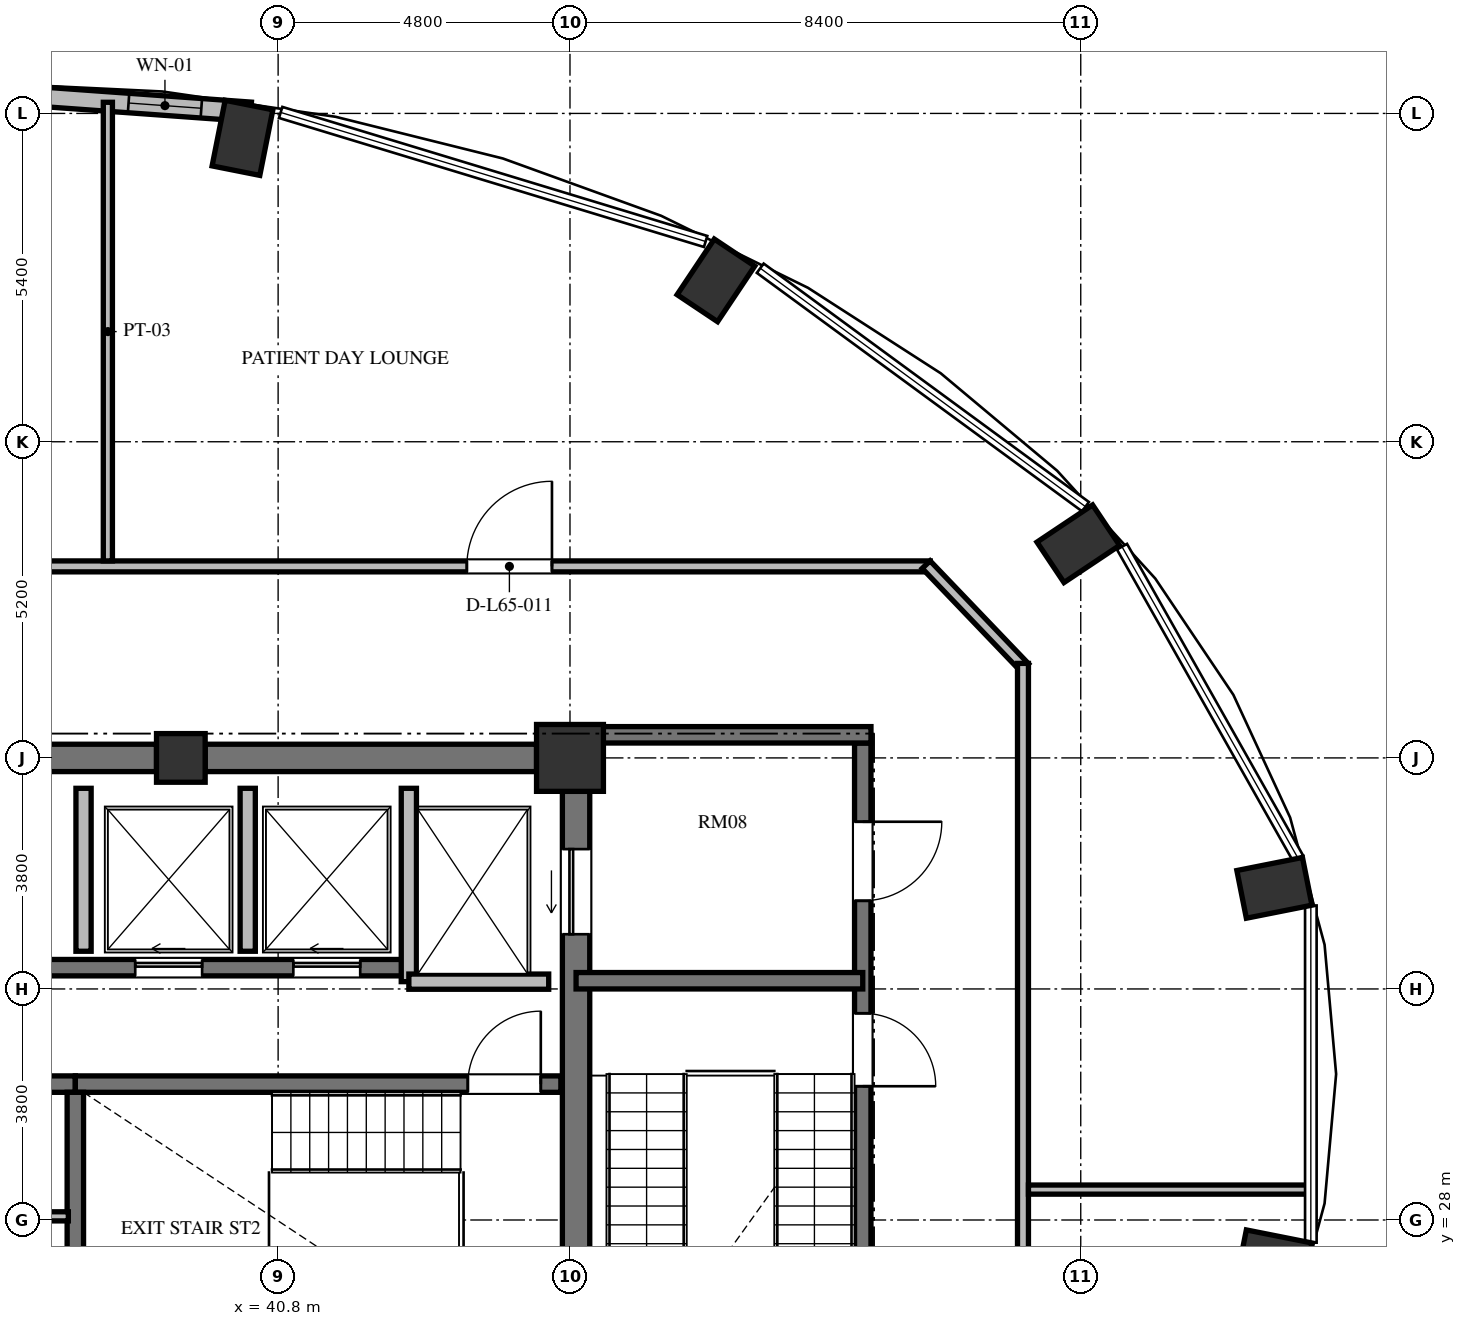
"""IFC4 building model, lengths in metres.
Left out: names, types, materials, properties, quantities, classifications, styles, units other than length and angle.
Written with IfcOpenShell. Run it as: python <this file> out.ifc"""

import sys

from ifc_helpers import new_model, si_unit, direction, frame, frame_2d, origin, origin_2d, place, context, subcontext, project, spatial, rectangle, extrude, element, fill, save


model = new_model("IFC4")
c1 = context("Model", 3, precision=1e-05, world=origin(), true_north=direction((0.0, 1.0)))
c2 = subcontext(c1, "Body", "Model", "MODEL_VIEW")
j1 = project(units=[si_unit("LENGTHUNIT", "METRE"), si_unit("PLANEANGLEUNIT", "RADIAN")], contexts=[c1])
p1 = place(None, origin())
s1 = spatial("IfcSite", under=j1, at=p1, CompositionType="ELEMENT")
p2 = place(p1, origin())
s2 = spatial("IfcBuilding", under=s1, at=p2, CompositionType="ELEMENT")
p3 = place(p2, frame((0.0, 0.0, 251.376)))
s3 = spatial("IfcBuildingStorey", under=s2, at=p3, CompositionType="ELEMENT", Elevation=251.376)
for number, where, z_axis, x_axis in (
    (1, (57.185, 27.337, 0.0), (0.0, 0.0, 1.0), (0.981, -0.195, 0.0)),
    (2, (57.185, 33.463, 0.0), (0.0, 0.0, 1.0), (0.981, 0.195, 0.0)),
    (3, (53.96, 39.123, 0.0), (0.0, 0.0, 1.0), (0.831, 0.556, 0.0)),
    (4, (48.0, 43.454, 0.0), (0.0, 0.0, 1.0), (0.556, 0.831, 0.0)),
    (5, (40.214, 45.798, 0.0), (0.0, 0.0, 1.0), (0.195, 0.981, 0.0)),
):
    element("IfcColumn", number, at=place(p3, frame(where, z_axis=z_axis, x_axis=x_axis)), inside=s3, PredefinedType="COLUMN", context=c2, shape_type="SweptSolid", body=[
        extrude(rectangle(XDim=1.1, YDim=0.8, at=origin_2d()), origin(), (0.0, 0.0, 1.0), 3.648),
    ])
p4 = place(p3, frame((45.6, 35.6, 0.0), z_axis=(0.0, 0.0, 1.0), x_axis=(1.0, 0.0, 0.0)))
e6 = element("IfcColumn", 6, at=p4, inside=s3, PredefinedType="COLUMN", context=c2, shape_type="SweptSolid", body=[
    extrude(rectangle(XDim=1.1, YDim=1.1, at=origin_2d()), origin(), (0.0, 0.0, 1.0), 3.648),
])
p5 = place(p3, frame((39.2, 35.6, 0.0), z_axis=(0.0, 0.0, 1.0), x_axis=(1.0, 0.0, 0.0)))
e7 = element("IfcColumn", 7, at=p5, inside=s3, PredefinedType="COLUMN", context=c2, shape_type="SweptSolid", body=[
    extrude(rectangle(XDim=0.8, YDim=0.8, at=origin_2d()), origin(), (0.0, 0.0, 1.0), 3.648),
])
p6 = place(p3, frame((45.7, 20.95, 0.0), z_axis=(0.0, 0.0, 1.0), x_axis=(0.0, 1.0, 0.0)))
e8 = element("IfcWall", 8, at=p6, inside=s3, PredefinedType="SHEAR", context=c2, shape_type="SweptSolid", body=[
    extrude(rectangle(XDim=14.1, YDim=0.45, at=frame_2d((7.05, 0.0))), origin(), (0.0, 0.0, 1.0), 3.648),
])
p7 = place(p6, frame((11.75, 0.0, 0.0)))
e9 = element("IfcOpeningElement", 9, at=p7, cuts=e8, PredefinedType="OPENING", context=c2, shape_type="SweptSolid", body=[
    extrude(rectangle(XDim=1.4, YDim=2.3, at=frame_2d((0.7, 1.15))), frame((0.0, 0.235, 0.0), z_axis=(0.0, -1.0, 0.0), x_axis=(1.0, 0.0, 0.0)), (0.0, 0.0, 1.0), 0.47),
])
p8 = place(p6, frame((0.95, 0.0, 0.0)))
e10 = element("IfcOpeningElement", 10, at=p8, cuts=e8, PredefinedType="OPENING", context=c2, shape_type="SweptSolid", body=[
    extrude(rectangle(XDim=1.4, YDim=2.3, at=frame_2d((0.7, 1.15))), frame((0.0, 0.235, 0.0), z_axis=(0.0, -1.0, 0.0), x_axis=(1.0, 0.0, 0.0)), (0.0, 0.0, 1.0), 0.47),
])
p9 = place(p3, frame((33.2, 35.6, 0.0), z_axis=(0.0, 0.0, 1.0), x_axis=(1.0, 0.0, 0.0)))
e11 = element("IfcWall", 11, at=p9, inside=s3, PredefinedType="SHEAR", context=c2, shape_type="SweptSolid", body=[
    extrude(rectangle(XDim=5.6, YDim=0.45, at=frame_2d((2.8, 0.0))), origin(), (0.0, 0.0, 1.0), 3.648),
])
p10 = place(p3, frame((39.6, 35.6, 0.0), z_axis=(0.0, 0.0, 1.0), x_axis=(1.0, 0.0, 0.0)))
e12 = element("IfcWall", 12, at=p10, inside=s3, PredefinedType="SHEAR", context=c2, shape_type="SweptSolid", body=[
    extrude(rectangle(XDim=5.45, YDim=0.45, at=frame_2d((2.725, 0.0))), origin(), (0.0, 0.0, 1.0), 3.648),
])
p11 = place(p3, frame((40.35, 46.226, 0.0), z_axis=(0.0, 0.0, 1.0), x_axis=(-0.997409061056, 0.071938619141, 0.0)))
e13 = element("IfcWall", 13, at=p11, inside=s3, PredefinedType="SOLIDWALL", context=c2, shape_type="SweptSolid", body=[
    extrude(rectangle(XDim=4.541, YDim=0.32, at=frame_2d((2.271, 0.0))), origin(), (0.0, 0.0, 1.0), 3.448),
])
p12 = place(p11, frame((0.815, 0.0, 0.85)))
e14 = element("IfcOpeningElement", 14, at=p12, cuts=e13, PredefinedType="OPENING", context=c2, shape_type="SweptSolid", body=[
    extrude(rectangle(XDim=1.2, YDim=2.2, at=frame_2d((0.6, 1.1))), frame((0.0, 0.17, 0.0), z_axis=(0.0, -1.0, 0.0), x_axis=(1.0, 0.0, 0.0)), (0.0, 0.0, 1.0), 0.34),
])
p13 = place(p3, frame((34.535, 30.235, 0.0), z_axis=(0.0, 0.0, 1.0), x_axis=(1.0, 0.0, 0.0)))
e15 = element("IfcWall", 15, at=p13, inside=s3, PredefinedType="SHEAR", context=c2, shape_type="SweptSolid", body=[
    extrude(rectangle(XDim=2.93, YDim=0.27, at=frame_2d((1.465, 0.0))), origin(), (0.0, 0.0, 1.0), 3.648),
])
p14 = place(p13, frame((0.915, 0.0, 0.0)))
e16 = element("IfcOpeningElement", 16, at=p14, cuts=e15, PredefinedType="OPENING", context=c2, shape_type="SweptSolid", body=[
    extrude(rectangle(XDim=1.1, YDim=2.15, at=frame_2d((0.55, 1.075))), frame((0.0, 0.145, 0.0), z_axis=(0.0, -1.0, 0.0), x_axis=(1.0, 0.0, 0.0)), (0.0, 0.0, 1.0), 0.29),
])
p15 = place(p3, frame((37.465, 30.235, 0.0), z_axis=(0.0, 0.0, 1.0), x_axis=(1.0, 0.0, 0.0)))
e17 = element("IfcWall", 17, at=p15, inside=s3, PredefinedType="SHEAR", context=c2, shape_type="SweptSolid", body=[
    extrude(rectangle(XDim=7.985, YDim=0.27, at=frame_2d((3.992, 0.0))), origin(), (0.0, 0.0, 1.0), 3.648),
])
p16 = place(p15, frame((6.455, 0.0, 0.0)))
e18 = element("IfcOpeningElement", 18, at=p16, cuts=e17, PredefinedType="OPENING", context=c2, shape_type="SweptSolid", body=[
    extrude(rectangle(XDim=1.2, YDim=2.15, at=frame_2d((0.6, 1.075))), frame((0.0, 0.145, 0.0), z_axis=(0.0, -1.0, 0.0), x_axis=(1.0, 0.0, 0.0)), (0.0, 0.0, 1.0), 0.29),
])
p17 = place(p3, frame((37.465, 26.02, 0.0), z_axis=(0.0, 0.0, 1.0), x_axis=(0.0, 1.0, 0.0)))
e19 = element("IfcWall", 19, at=p17, inside=s3, PredefinedType="SHEAR", context=c2, shape_type="SweptSolid", body=[
    extrude(rectangle(XDim=4.08, YDim=0.27, at=frame_2d((2.04, 0.0))), origin(), (0.0, 0.0, 1.0), 3.648),
])
p18 = place(p3, frame((34.65, 28.06, 0.0), z_axis=(0.0, 0.0, 1.0), x_axis=(1.0, 0.0, 0.0)))
e20 = element("IfcWall", 20, at=p18, inside=s3, PredefinedType="PARTITIONING", context=c2, shape_type="SweptSolid", body=[
    extrude(rectangle(XDim=2.7, YDim=0.15, at=frame_2d((1.35, 0.0))), origin(), (0.0, 0.0, 1.0), 3.448),
])
p19 = place(p3, frame((26.55, 32.15, 0.0), z_axis=(0.0, 0.0, 1.0), x_axis=(1.0, 0.0, 0.0)))
e21 = element("IfcWall", 21, at=p19, inside=s3, PredefinedType="SHEAR", context=c2, shape_type="SweptSolid", body=[
    extrude(rectangle(XDim=16.4, YDim=0.27, at=frame_2d((8.2, 0.0))), origin(), (0.0, 0.0, 1.0), 3.648),
])
p20 = place(p19, frame((2.175, 0.0, 0.0)))
e22 = element("IfcOpeningElement", 22, at=p20, cuts=e21, PredefinedType="OPENING", context=c2, shape_type="SweptSolid", body=[
    extrude(rectangle(XDim=1.05, YDim=2.15, at=frame_2d((0.525, 1.075))), frame((0.0, 0.145, 0.0), z_axis=(0.0, -1.0, 0.0), x_axis=(1.0, 0.0, 0.0)), (0.0, 0.0, 1.0), 0.29),
])
p21 = place(p19, frame((7.575, 0.0, 0.0)))
e23 = element("IfcOpeningElement", 23, at=p21, cuts=e21, PredefinedType="OPENING", context=c2, shape_type="SweptSolid", body=[
    extrude(rectangle(XDim=1.05, YDim=2.15, at=frame_2d((0.525, 1.075))), frame((0.0, 0.145, 0.0), z_axis=(0.0, -1.0, 0.0), x_axis=(1.0, 0.0, 0.0)), (0.0, 0.0, 1.0), 0.29),
])
p22 = place(p19, frame((11.9, 0.0, 0.0)))
e24 = element("IfcOpeningElement", 24, at=p22, cuts=e21, PredefinedType="OPENING", context=c2, shape_type="SweptSolid", body=[
    extrude(rectangle(XDim=1.1, YDim=2.2, at=frame_2d((0.55, 1.1))), frame((0.0, 0.145, 0.0), z_axis=(0.0, -1.0, 0.0), x_axis=(1.0, 0.0, 0.0)), (0.0, 0.0, 1.0), 0.29),
])
p23 = place(p19, frame((14.5, 0.0, 0.0)))
e25 = element("IfcOpeningElement", 25, at=p23, cuts=e21, PredefinedType="OPENING", context=c2, shape_type="SweptSolid", body=[
    extrude(rectangle(XDim=1.1, YDim=2.2, at=frame_2d((0.55, 1.1))), frame((0.0, 0.145, 0.0), z_axis=(0.0, -1.0, 0.0), x_axis=(1.0, 0.0, 0.0)), (0.0, 0.0, 1.0), 0.29),
])
p24 = place(p3, frame((42.95, 31.92, 0.0), z_axis=(0.0, 0.0, 1.0), x_axis=(0.0, 1.0, 0.0)))
e26 = element("IfcWall", 26, at=p24, inside=s3, PredefinedType="SOLIDWALL", context=c2, shape_type="SweptSolid", body=[
    extrude(rectangle(XDim=3.18, YDim=0.25, at=frame_2d((1.59, 0.0))), origin(), (0.0, 0.0, 1.0), 3.448),
])
p25 = place(p3, frame((42.95, 31.92, 0.0), z_axis=(0.0, 0.0, 1.0), x_axis=(1.0, 0.0, 0.0)))
e27 = element("IfcWall", 27, at=p25, inside=s3, PredefinedType="SOLIDWALL", context=c2, shape_type="SweptSolid", body=[
    extrude(rectangle(XDim=2.3, YDim=0.25, at=frame_2d((1.15, 0.0))), origin(), (0.0, 0.0, 1.0), 3.448),
])
for number, where, z_axis, x_axis in (
    (28, (37.6, 32.42, 0.0), (0.0, 0.0, 1.0), (0.0, 1.0, 0.0)),
    (29, (40.3, 32.42, 0.0), (0.0, 0.0, 1.0), (0.0, 1.0, 0.0)),
):
    element("IfcWall", number, at=place(p3, frame(where, z_axis=z_axis, x_axis=x_axis)), inside=s3, PredefinedType="SOLIDWALL", context=c2, shape_type="SweptSolid", body=[
        extrude(rectangle(XDim=2.68, YDim=0.25, at=frame_2d((1.34, 0.0))), origin(), (0.0, 0.0, 1.0), 3.448),
    ])
p26 = place(p3, frame((50.415, 35.845, 0.0), z_axis=(0.0, 0.0, 1.0), x_axis=(0.0, -1.0, 0.0)))
e30 = element("IfcWall", 30, at=p26, inside=s3, PredefinedType="SHEAR", context=c2, shape_type="SweptSolid", body=[
    extrude(rectangle(XDim=15.825, YDim=0.27, at=frame_2d((7.913, 0.0))), origin(), (0.0, 0.0, 1.0), 3.648),
])
p27 = place(p26, frame((4.445, 0.0, 0.0)))
e31 = element("IfcOpeningElement", 31, at=p27, cuts=e30, PredefinedType="OPENING", context=c2, shape_type="SweptSolid", body=[
    extrude(rectangle(XDim=1.2, YDim=2.15, at=frame_2d((0.6, 1.075))), frame((0.0, 0.145, 0.0), z_axis=(0.0, -1.0, 0.0), x_axis=(1.0, 0.0, 0.0)), (0.0, 0.0, 1.0), 0.29),
])
p28 = place(p26, frame((1.295, 0.0, 0.0)))
e32 = element("IfcOpeningElement", 32, at=p28, cuts=e30, PredefinedType="OPENING", context=c2, shape_type="SweptSolid", body=[
    extrude(rectangle(XDim=1.3, YDim=2.2, at=frame_2d((0.65, 1.1))), frame((0.0, 0.145, 0.0), z_axis=(0.0, -1.0, 0.0), x_axis=(1.0, 0.0, 0.0)), (0.0, 0.0, 1.0), 0.29),
])
p29 = place(p26, frame((13.095, 0.0, 0.0)))
e33 = element("IfcOpeningElement", 33, at=p29, cuts=e30, PredefinedType="OPENING", context=c2, shape_type="SweptSolid", body=[
    extrude(rectangle(XDim=1.3, YDim=2.2, at=frame_2d((0.65, 1.1))), frame((0.0, 0.145, 0.0), z_axis=(0.0, -1.0, 0.0), x_axis=(1.0, 0.0, 0.0)), (0.0, 0.0, 1.0), 0.29),
])
p30 = place(p3, frame((45.925, 35.98, 0.0), z_axis=(0.0, 0.0, 1.0), x_axis=(1.0, 0.0, 0.0)))
e34 = element("IfcWall", 34, at=p30, inside=s3, PredefinedType="SHEAR", context=c2, shape_type="SweptSolid", body=[
    extrude(rectangle(XDim=4.625, YDim=0.27, at=frame_2d((2.312, 0.0))), origin(), (0.0, 0.0, 1.0), 3.648),
])
p31 = place(p3, frame((45.7, 31.935, 0.0), z_axis=(0.0, 0.0, 1.0), x_axis=(1.0, 0.0, 0.0)))
e35 = element("IfcWall", 35, at=p31, inside=s3, PredefinedType="SHEAR", context=c2, shape_type="SweptSolid", body=[
    extrude(rectangle(XDim=4.715, YDim=0.27, at=frame_2d((2.357, 0.0))), origin(), (0.0, 0.0, 1.0), 3.648),
])
p32 = place(p3, frame((30.71, 38.75, 0.0), z_axis=(0.0, 0.0, 1.0), x_axis=(1.0, 0.0, 0.0)))
e36 = element("IfcWall", 36, at=p32, inside=s3, PredefinedType="PARTITIONING", context=c2, shape_type="SweptSolid", body=[
    extrude(rectangle(XDim=20.815, YDim=0.18, at=frame_2d((10.408, 0.0))), origin(), (0.0, 0.0, 1.0), 3.073),
])
p33 = place(p32, frame((13.194, 0.0, 0.0)))
e37 = element("IfcOpeningElement", 37, at=p33, cuts=e36, PredefinedType="OPENING", context=c2, shape_type="SweptSolid", body=[
    extrude(rectangle(XDim=1.4, YDim=2.2, at=frame_2d((0.7, 1.1))), frame((0.0, 0.1, 0.0), z_axis=(0.0, -1.0, 0.0), x_axis=(1.0, 0.0, 0.0)), (0.0, 0.0, 1.0), 0.2),
])
p34 = place(p3, frame((51.458, 38.779, 0.0), z_axis=(0.0, 0.0, 1.0), x_axis=(0.691359830363, -0.722510612352, 0.0)))
e38 = element("IfcWall", 38, at=p34, inside=s3, PredefinedType="PARTITIONING", context=c2, shape_type="SweptSolid", body=[
    extrude(rectangle(XDim=2.343, YDim=0.18, at=frame_2d((1.172, 0.0))), origin(), (0.0, 0.0, 1.0), 3.033),
])
p35 = place(p3, frame((53.05, 37.155, 0.0), z_axis=(0.0, 0.0, 1.0), x_axis=(0.0, -1.0, 0.0)))
e39 = element("IfcWall", 39, at=p35, inside=s3, PredefinedType="PARTITIONING", context=c2, shape_type="SweptSolid", body=[
    extrude(rectangle(XDim=13.509, YDim=0.18, at=frame_2d((6.754, 0.0))), origin(), (0.0, 0.0, 1.0), 3.448),
])
p36 = place(p3, frame((53.14, 28.5, 0.0), z_axis=(0.0, 0.0, 1.0), x_axis=(1.0, 0.0, 0.0)))
e40 = element("IfcWall", 40, at=p36, inside=s3, PredefinedType="PARTITIONING", context=c2, shape_type="SweptSolid", body=[
    extrude(rectangle(XDim=4.632, YDim=0.15, at=frame_2d((2.316, 0.0))), origin(), (0.0, 0.0, 1.0), 3.448),
])
p37 = place(p3, frame((38.0, 38.84, 0.0), z_axis=(0.0, 0.0, 1.0), x_axis=(0.0, 1.0, 0.0)))
e41 = element("IfcWall", 41, at=p37, inside=s3, PredefinedType="PARTITIONING", context=c2, shape_type="SweptSolid", body=[
    extrude(rectangle(XDim=7.543, YDim=0.15, at=frame_2d((3.771, 0.0))), origin(), (0.0, 0.0, 1.0), 3.448),
])
p38 = place(p12, origin())
e42 = element("IfcWindow", 42, at=p38, inside=s3, PartitioningType="SINGLE_PANEL", PredefinedType="WINDOW", context=c2, shape_type="SweptSolid", body=[
    extrude(rectangle(XDim=1.2, YDim=2.2, at=frame_2d((0.6, 1.1))), frame((0.0, 0.03, 0.0), z_axis=(0.0, -1.0, 0.0), x_axis=(1.0, 0.0, 0.0)), (0.0, 0.0, 1.0), 0.06),
])
fill(e14, e42)
p39 = place(p16, origin())
e43 = element("IfcDoor", 43, at=p39, inside=s3, OperationType="SINGLE_SWING_RIGHT", PredefinedType="DOOR", context=c2, shape_type="SweptSolid", body=[
    extrude(rectangle(XDim=1.2, YDim=2.15, at=frame_2d((0.6, 1.075))), frame((0.0, 0.025, 0.0), z_axis=(0.0, -1.0, 0.0), x_axis=(1.0, 0.0, 0.0)), (0.0, 0.0, 1.0), 0.05),
])
fill(e18, e43)
p40 = place(p22, origin())
e44 = element("IfcDoor", 44, at=p40, inside=s3, OperationType="SLIDING_TO_LEFT", PredefinedType="DOOR", context=c2, shape_type="SweptSolid", body=[
    extrude(rectangle(XDim=1.1, YDim=2.2, at=frame_2d((0.55, 1.1))), frame((0.0, 0.025, 0.0), z_axis=(0.0, -1.0, 0.0), x_axis=(1.0, 0.0, 0.0)), (0.0, 0.0, 1.0), 0.05),
])
fill(e24, e44)
p41 = place(p23, origin())
e45 = element("IfcDoor", 45, at=p41, inside=s3, OperationType="SLIDING_TO_LEFT", PredefinedType="DOOR", context=c2, shape_type="SweptSolid", body=[
    extrude(rectangle(XDim=1.1, YDim=2.2, at=frame_2d((0.55, 1.1))), frame((0.0, 0.025, 0.0), z_axis=(0.0, -1.0, 0.0), x_axis=(1.0, 0.0, 0.0)), (0.0, 0.0, 1.0), 0.05),
])
fill(e25, e45)
p42 = place(p7, origin())
e46 = element("IfcDoor", 46, at=p42, inside=s3, OperationType="SLIDING_TO_LEFT", PredefinedType="DOOR", context=c2, shape_type="SweptSolid", body=[
    extrude(rectangle(XDim=1.4, YDim=2.3, at=frame_2d((0.7, 1.15))), frame((0.0, 0.025, 0.0), z_axis=(0.0, -1.0, 0.0), x_axis=(1.0, 0.0, 0.0)), (0.0, 0.0, 1.0), 0.05),
])
fill(e9, e46)
p43 = place(p27, origin())
e47 = element("IfcDoor", 47, at=p43, inside=s3, OperationType="SINGLE_SWING_RIGHT", PredefinedType="DOOR", context=c2, shape_type="SweptSolid", body=[
    extrude(rectangle(XDim=1.2, YDim=2.15, at=frame_2d((0.6, 1.075))), frame((0.0, 0.025, 0.0), z_axis=(0.0, -1.0, 0.0), x_axis=(1.0, 0.0, 0.0)), (0.0, 0.0, 1.0), 0.05),
])
fill(e31, e47)
p44 = place(p28, origin())
e48 = element("IfcDoor", 48, at=p44, inside=s3, OperationType="SINGLE_SWING_LEFT", PredefinedType="DOOR", context=c2, shape_type="SweptSolid", body=[
    extrude(rectangle(XDim=1.3, YDim=2.2, at=frame_2d((0.65, 1.1))), frame((0.0, 0.025, 0.0), z_axis=(0.0, -1.0, 0.0), x_axis=(1.0, 0.0, 0.0)), (0.0, 0.0, 1.0), 0.05),
])
fill(e32, e48)
p45 = place(p33, origin())
e49 = element("IfcDoor", 49, at=p45, inside=s3, OperationType="SINGLE_SWING_RIGHT", PredefinedType="DOOR", context=c2, shape_type="SweptSolid", body=[
    extrude(rectangle(XDim=1.4, YDim=2.2, at=frame_2d((0.7, 1.1))), frame((0.0, 0.025, 0.0), z_axis=(0.0, -1.0, 0.0), x_axis=(1.0, 0.0, 0.0)), (0.0, 0.0, 1.0), 0.05),
])
fill(e37, e49)
save(model, sys.argv[1])
